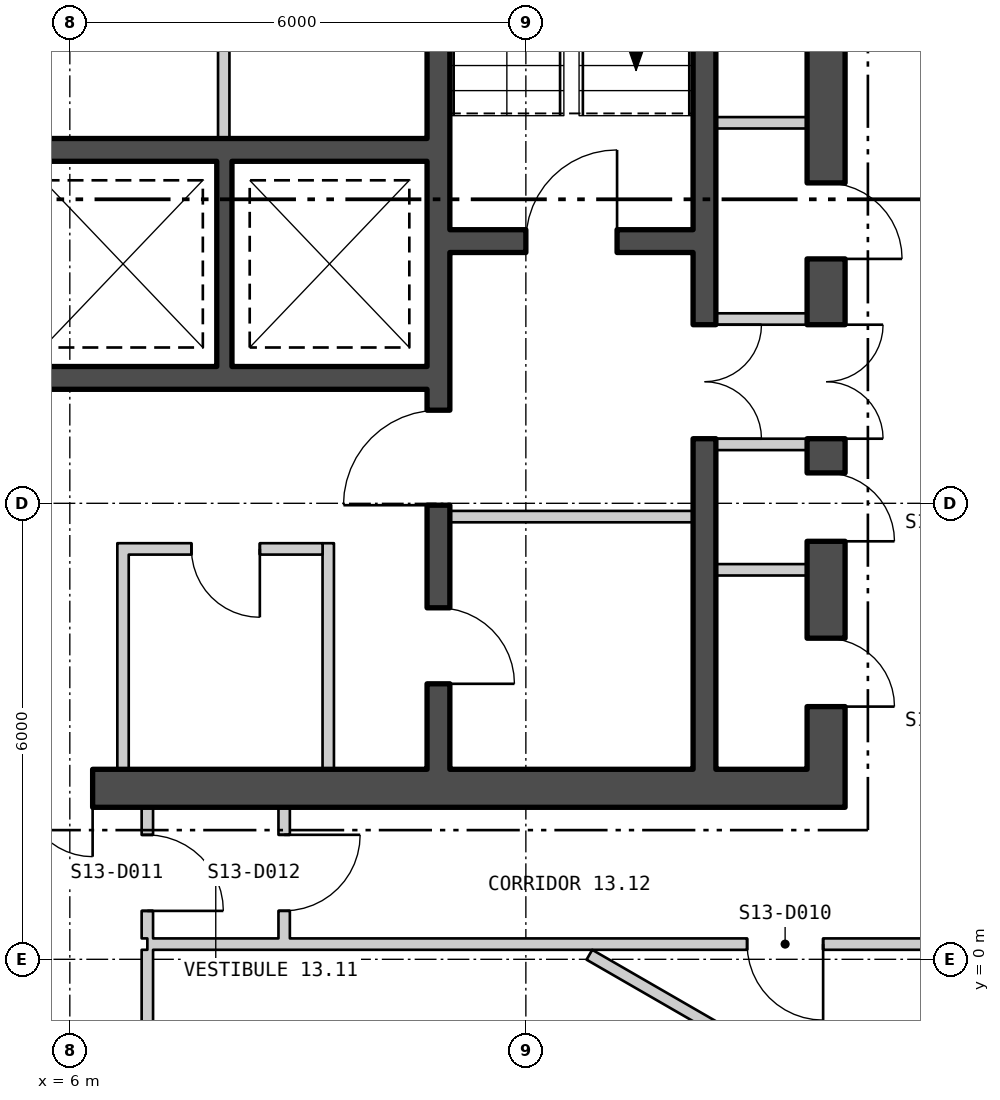
"""IFC4 building model, lengths in metres.
Left out: names, types, materials, properties, quantities, classifications, styles, units other than length and angle.
Written with IfcOpenShell. Run it as: python <this file> out.ifc"""

import sys

from ifc_helpers import new_model, si_unit, direction, frame, frame_2d, origin, place, context, subcontext, project, spatial, polyline, rectangle, outline, extrude, element, fill, save


model = new_model("IFC4")
c1 = context("Model", 3, precision=1e-05, world=origin(), true_north=direction((0.0, 1.0)))
c2 = subcontext(c1, "Body", "Model", "MODEL_VIEW")
j1 = project(units=[si_unit("LENGTHUNIT", "METRE"), si_unit("PLANEANGLEUNIT", "RADIAN")], contexts=[c1])
p1 = place(None, origin())
s1 = spatial("IfcSite", under=j1, at=p1, CompositionType="ELEMENT")
p2 = place(p1, origin())
s2 = spatial("IfcBuilding", under=s1, at=p2, CompositionType="ELEMENT")
p3 = place(p2, frame((0.0, 0.0, 174.9)))
s3 = spatial("IfcBuildingStorey", under=s2, at=p3, CompositionType="ELEMENT", Elevation=174.9)
p4 = place(p3, frame((3.9, -26.401, -0.18), z_axis=(0.0, 0.0, 1.0), x_axis=(0.500000335318, 0.866025210188, 0.0)))
e1 = element("IfcWall", 1, at=p4, inside=s3, PredefinedType="SOLIDWALL", context=c2, shape_type="SweptSolid", body=[
    extrude(outline(polyline([(-0.13, -0.225), (45.88, -0.225), (45.62, 0.225), (0.13, 0.225), (-0.13, -0.225)])), origin(), (0.0, 0.0, 1.0), 3.68),
])
p5 = place(p4, frame((1.425, 0.0, 1.08)))
e2 = element("IfcOpeningElement", 2, at=p5, cuts=e1, PredefinedType="OPENING", context=c2, shape_type="SweptSolid", body=[
    extrude(rectangle(XDim=2.4, YDim=2.0, at=frame_2d((1.2, 1.0))), frame((0.0, 0.235, 0.0), z_axis=(0.0, -1.0, 0.0), x_axis=(1.0, 0.0, 0.0)), (0.0, 0.0, 1.0), 0.47),
])
p6 = place(p4, frame((5.895, 0.0, 1.08)))
e3 = element("IfcOpeningElement", 3, at=p6, cuts=e1, PredefinedType="OPENING", context=c2, shape_type="SweptSolid", body=[
    extrude(rectangle(XDim=2.4, YDim=2.0, at=frame_2d((1.2, 1.0))), frame((0.0, 0.235, 0.0), z_axis=(0.0, -1.0, 0.0), x_axis=(1.0, 0.0, 0.0)), (0.0, 0.0, 1.0), 0.47),
])
p7 = place(p4, frame((10.403, 0.0, 1.08)))
e4 = element("IfcOpeningElement", 4, at=p7, cuts=e1, PredefinedType="OPENING", context=c2, shape_type="SweptSolid", body=[
    extrude(rectangle(XDim=2.4, YDim=2.0, at=frame_2d((1.2, 1.0))), frame((0.0, 0.235, 0.0), z_axis=(0.0, -1.0, 0.0), x_axis=(1.0, 0.0, 0.0)), (0.0, 0.0, 1.0), 0.47),
])
p8 = place(p4, frame((14.912, 0.0, 1.08)))
e5 = element("IfcOpeningElement", 5, at=p8, cuts=e1, PredefinedType="OPENING", context=c2, shape_type="SweptSolid", body=[
    extrude(rectangle(XDim=2.4, YDim=2.0, at=frame_2d((1.2, 1.0))), frame((0.0, 0.235, 0.0), z_axis=(0.0, -1.0, 0.0), x_axis=(1.0, 0.0, 0.0)), (0.0, 0.0, 1.0), 0.47),
])
p9 = place(p4, frame((19.421, 0.0, 1.08)))
e6 = element("IfcOpeningElement", 6, at=p9, cuts=e1, PredefinedType="OPENING", context=c2, shape_type="SweptSolid", body=[
    extrude(rectangle(XDim=2.4, YDim=2.0, at=frame_2d((1.2, 1.0))), frame((0.0, 0.235, 0.0), z_axis=(0.0, -1.0, 0.0), x_axis=(1.0, 0.0, 0.0)), (0.0, 0.0, 1.0), 0.47),
])
p10 = place(p4, frame((23.929, 0.0, 1.08)))
e7 = element("IfcOpeningElement", 7, at=p10, cuts=e1, PredefinedType="OPENING", context=c2, shape_type="SweptSolid", body=[
    extrude(rectangle(XDim=2.4, YDim=2.0, at=frame_2d((1.2, 1.0))), frame((0.0, 0.235, 0.0), z_axis=(0.0, -1.0, 0.0), x_axis=(1.0, 0.0, 0.0)), (0.0, 0.0, 1.0), 0.47),
])
p11 = place(p4, frame((37.455, 0.0, 1.08)))
e8 = element("IfcOpeningElement", 8, at=p11, cuts=e1, PredefinedType="OPENING", context=c2, shape_type="SweptSolid", body=[
    extrude(rectangle(XDim=2.4, YDim=2.0, at=frame_2d((1.2, 1.0))), frame((0.0, 0.235, 0.0), z_axis=(0.0, -1.0, 0.0), x_axis=(1.0, 0.0, 0.0)), (0.0, 0.0, 1.0), 0.47),
])
p12 = place(p4, frame((41.925, 0.0, 1.08)))
e9 = element("IfcOpeningElement", 9, at=p12, cuts=e1, PredefinedType="OPENING", context=c2, shape_type="SweptSolid", body=[
    extrude(rectangle(XDim=2.4, YDim=2.0, at=frame_2d((1.2, 1.0))), frame((0.0, 0.235, 0.0), z_axis=(0.0, -1.0, 0.0), x_axis=(1.0, 0.0, 0.0)), (0.0, 0.0, 1.0), 0.47),
])
p13 = place(p3, frame((-16.2, 2.25, 0.0), z_axis=(0.0, 0.0, 1.0), x_axis=(1.0, 0.0, 0.0)))
e10 = element("IfcWall", 10, at=p13, inside=s3, PredefinedType="SHEAR", context=c2, shape_type="SweptSolid", body=[
    extrude(rectangle(XDim=32.4, YDim=0.5, at=frame_2d((16.2, 0.0))), origin(), (0.0, 0.0, 1.0), 3.7),
])
p14 = place(p13, frame((10.7, 0.0, 0.0)))
e11 = element("IfcOpeningElement", 11, at=p14, cuts=e10, PredefinedType="OPENING", context=c2, shape_type="SweptSolid", body=[
    extrude(rectangle(XDim=1.8, YDim=2.4, at=frame_2d((0.9, 1.2))), frame((0.0, 0.26, 0.0), z_axis=(0.0, -1.0, 0.0), x_axis=(1.0, 0.0, 0.0)), (0.0, 0.0, 1.0), 0.52),
])
p15 = place(p13, frame((20.7, 0.0, 0.0)))
e12 = element("IfcOpeningElement", 12, at=p15, cuts=e10, PredefinedType="OPENING", context=c2, shape_type="SweptSolid", body=[
    extrude(rectangle(XDim=1.8, YDim=2.4, at=frame_2d((0.9, 1.2))), frame((0.0, 0.26, 0.0), z_axis=(0.0, -1.0, 0.0), x_axis=(1.0, 0.0, 0.0)), (0.0, 0.0, 1.0), 0.52),
])
p16 = place(p3, frame((15.95, 2.5, 0.0), z_axis=(0.0, 0.0, 1.0), x_axis=(0.0, 1.0, 0.0)))
e13 = element("IfcWall", 13, at=p16, inside=s3, PredefinedType="SHEAR", context=c2, shape_type="SweptSolid", body=[
    extrude(rectangle(XDim=15.0, YDim=0.5, at=frame_2d((7.5, 0.0))), origin(), (0.0, 0.0, 1.0), 3.7),
])
p17 = place(p16, frame((4.35, 0.0, 0.0)))
e14 = element("IfcOpeningElement", 14, at=p17, cuts=e13, PredefinedType="OPENING", context=c2, shape_type="SweptSolid", body=[
    extrude(rectangle(XDim=1.5, YDim=2.1, at=frame_2d((0.75, 1.05))), frame((0.0, 0.26, 0.0), z_axis=(0.0, -1.0, 0.0), x_axis=(1.0, 0.0, 0.0)), (0.0, 0.0, 1.0), 0.52),
])
p18 = place(p16, frame((0.825, 0.0, 0.0)))
e15 = element("IfcOpeningElement", 15, at=p18, cuts=e13, PredefinedType="OPENING", context=c2, shape_type="SweptSolid", body=[
    extrude(rectangle(XDim=0.9, YDim=2.1, at=frame_2d((0.45, 1.05))), frame((0.0, 0.26, 0.0), z_axis=(0.0, -1.0, 0.0), x_axis=(1.0, 0.0, 0.0)), (0.0, 0.0, 1.0), 0.52),
])
p19 = place(p16, frame((3.0, 0.0, 0.0)))
e16 = element("IfcOpeningElement", 16, at=p19, cuts=e13, PredefinedType="OPENING", context=c2, shape_type="SweptSolid", body=[
    extrude(rectangle(XDim=0.9, YDim=2.1, at=frame_2d((0.45, 1.05))), frame((0.0, 0.26, 0.0), z_axis=(0.0, -1.0, 0.0), x_axis=(1.0, 0.0, 0.0)), (0.0, 0.0, 1.0), 0.52),
])
p20 = place(p16, frame((6.716, 0.0, 0.0)))
e17 = element("IfcOpeningElement", 17, at=p20, cuts=e13, PredefinedType="OPENING", context=c2, shape_type="SweptSolid", body=[
    extrude(rectangle(XDim=1.0, YDim=2.1, at=frame_2d((0.5, 1.05))), frame((0.0, 0.26, 0.0), z_axis=(0.0, -1.0, 0.0), x_axis=(1.0, 0.0, 0.0)), (0.0, 0.0, 1.0), 0.52),
])
p21 = place(p16, frame((11.341, 0.0, 0.0)))
e18 = element("IfcOpeningElement", 18, at=p21, cuts=e13, PredefinedType="OPENING", context=c2, shape_type="SweptSolid", body=[
    extrude(rectangle(XDim=0.9, YDim=2.1, at=frame_2d((0.45, 1.05))), frame((0.0, 0.26, 0.0), z_axis=(0.0, -1.0, 0.0), x_axis=(1.0, 0.0, 0.0)), (0.0, 0.0, 1.0), 0.52),
])
p22 = place(p3, frame((10.85, 2.5, 0.0), z_axis=(0.0, 0.0, 1.0), x_axis=(0.0, 1.0, 0.0)))
e19 = element("IfcWall", 19, at=p22, inside=s3, PredefinedType="SHEAR", context=c2, shape_type="SweptSolid", body=[
    extrude(rectangle(XDim=15.0, YDim=0.3, at=frame_2d((7.5, 0.0))), origin(), (0.0, 0.0, 1.0), 3.7),
])
p23 = place(p22, frame((3.475, 0.0, 0.0)))
e20 = element("IfcOpeningElement", 20, at=p23, cuts=e19, PredefinedType="OPENING", context=c2, shape_type="SweptSolid", body=[
    extrude(rectangle(XDim=1.25, YDim=2.1, at=frame_2d((0.625, 1.05))), frame((0.0, 0.16, 0.0), z_axis=(0.0, -1.0, 0.0), x_axis=(1.0, 0.0, 0.0)), (0.0, 0.0, 1.0), 0.32),
])
p24 = place(p22, frame((1.125, 0.0, 0.0)))
e21 = element("IfcOpeningElement", 21, at=p24, cuts=e19, PredefinedType="OPENING", context=c2, shape_type="SweptSolid", body=[
    extrude(rectangle(XDim=1.0, YDim=2.1, at=frame_2d((0.5, 1.05))), frame((0.0, 0.16, 0.0), z_axis=(0.0, -1.0, 0.0), x_axis=(1.0, 0.0, 0.0)), (0.0, 0.0, 1.0), 0.32),
])
p25 = place(p3, frame((14.35, 2.5, 0.0), z_axis=(0.0, 0.0, 1.0), x_axis=(0.0, 1.0, 0.0)))
e22 = element("IfcWall", 22, at=p25, inside=s3, PredefinedType="SHEAR", context=c2, shape_type="SweptSolid", body=[
    extrude(rectangle(XDim=15.0, YDim=0.3, at=frame_2d((7.5, 0.0))), origin(), (0.0, 0.0, 1.0), 3.7),
])
p26 = place(p25, frame((4.35, 0.0, 0.0)))
e23 = element("IfcOpeningElement", 23, at=p26, cuts=e22, PredefinedType="OPENING", context=c2, shape_type="SweptSolid", body=[
    extrude(rectangle(XDim=1.5, YDim=2.1, at=frame_2d((0.75, 1.05))), frame((0.0, 0.16, 0.0), z_axis=(0.0, -1.0, 0.0), x_axis=(1.0, 0.0, 0.0)), (0.0, 0.0, 1.0), 0.32),
])
p27 = place(p3, frame((11.0, 9.45, 0.0), z_axis=(0.0, 0.0, 1.0), x_axis=(1.0, 0.0, 0.0)))
e24 = element("IfcWall", 24, at=p27, inside=s3, PredefinedType="SHEAR", context=c2, shape_type="SweptSolid", body=[
    extrude(rectangle(XDim=3.2, YDim=0.3, at=frame_2d((1.6, 0.0))), origin(), (0.0, 0.0, 1.0), 3.7),
])
p28 = place(p27, frame((1.0, 0.0, 0.0)))
e25 = element("IfcOpeningElement", 25, at=p28, cuts=e24, PredefinedType="OPENING", context=c2, shape_type="SweptSolid", body=[
    extrude(rectangle(XDim=1.2, YDim=2.1, at=frame_2d((0.6, 1.05))), frame((0.0, 0.16, 0.0), z_axis=(0.0, -1.0, 0.0), x_axis=(1.0, 0.0, 0.0)), (0.0, 0.0, 1.0), 0.32),
])
p29 = place(p3, frame((2.6, 10.65, 0.0), z_axis=(0.0, 0.0, 1.0), x_axis=(1.0, 0.0, 0.0)))
e26 = element("IfcWall", 26, at=p29, inside=s3, PredefinedType="SHEAR", context=c2, shape_type="SweptSolid", body=[
    extrude(rectangle(XDim=8.1, YDim=0.3, at=frame_2d((4.05, 0.0))), origin(), (0.0, 0.0, 1.0), 3.7),
])
p30 = place(p29, frame((0.933, 0.0, 0.0)))
e27 = element("IfcOpeningElement", 27, at=p30, cuts=e26, PredefinedType="OPENING", context=c2, shape_type="SweptSolid", body=[
    extrude(rectangle(XDim=1.0, YDim=2.1, at=frame_2d((0.5, 1.05))), frame((0.0, 0.16, 0.0), z_axis=(0.0, -1.0, 0.0), x_axis=(1.0, 0.0, 0.0)), (0.0, 0.0, 1.0), 0.32),
])
p31 = place(p3, frame((2.6, 7.65, 0.0), z_axis=(0.0, 0.0, 1.0), x_axis=(1.0, 0.0, 0.0)))
e28 = element("IfcWall", 28, at=p31, inside=s3, PredefinedType="SHEAR", context=c2, shape_type="SweptSolid", body=[
    extrude(rectangle(XDim=8.1, YDim=0.3, at=frame_2d((4.05, 0.0))), origin(), (0.0, 0.0, 1.0), 3.7),
])
p32 = place(p3, frame((8.033, 7.8, 0.0), z_axis=(0.0, 0.0, 1.0), x_axis=(0.0, 1.0, 0.0)))
e29 = element("IfcWall", 29, at=p32, inside=s3, PredefinedType="SHEAR", context=c2, shape_type="SweptSolid", body=[
    extrude(rectangle(XDim=2.7, YDim=0.2, at=frame_2d((1.35, 0.0))), origin(), (0.0, 0.0, 1.0), 3.7),
])
p33 = place(p3, frame((8.025, 10.8, 0.0), z_axis=(0.0, 0.0, 1.0), x_axis=(0.0, 1.0, 0.0)))
e30 = element("IfcWall", 30, at=p33, inside=s3, PredefinedType="PARTITIONING", context=c2, shape_type="SweptSolid", body=[
    extrude(rectangle(XDim=3.6, YDim=0.15, at=frame_2d((1.8, 0.0))), origin(), (0.0, 0.0, 1.0), 3.7),
])
p34 = place(p33, frame((1.175, 0.0, 0.0)))
e31 = element("IfcOpeningElement", 31, at=p34, cuts=e30, PredefinedType="OPENING", context=c2, shape_type="SweptSolid", body=[
    extrude(rectangle(XDim=1.25, YDim=2.1, at=frame_2d((0.625, 1.05))), frame((0.0, 0.085, 0.0), z_axis=(0.0, -1.0, 0.0), x_axis=(1.0, 0.0, 0.0)), (0.0, 0.0, 1.0), 0.17),
])
p35 = place(p3, frame((11.0, 5.825, 0.0), z_axis=(0.0, 0.0, 1.0), x_axis=(1.0, 0.0, 0.0)))
e32 = element("IfcWall", 32, at=p35, inside=s3, PredefinedType="PARTITIONING", context=c2, shape_type="SweptSolid", body=[
    extrude(rectangle(XDim=3.2, YDim=0.15, at=frame_2d((1.6, 0.0))), origin(), (0.0, 0.0, 1.0), 3.7),
])
for number, where, z_axis, x_axis in (
    (33, (14.5, 6.775, 0.0), (0.0, 0.0, 1.0), (1.0, 0.0, 0.0)),
    (34, (14.5, 8.425, 0.0), (0.0, 0.0, 1.0), (1.0, 0.0, 0.0)),
    (35, (14.5, 5.125, 0.0), (0.0, 0.0, 1.0), (1.0, 0.0, 0.0)),
    (36, (14.5, 11.007, 0.0), (0.0, 0.0, 1.0), (1.0, 0.0, 0.0)),
):
    element("IfcWall", number, at=place(p3, frame(where, z_axis=z_axis, x_axis=x_axis)), inside=s3, PredefinedType="PARTITIONING", context=c2, shape_type="SweptSolid", body=[
        extrude(rectangle(XDim=1.2, YDim=0.15, at=frame_2d((0.6, 0.0))), origin(), (0.0, 0.0, 1.0), 3.7),
    ])
for number, where, z_axis, x_axis in (
    (37, (6.7, 2.5, 0.0), (0.0, 0.0, 1.0), (0.0, 1.0, 0.0)),
    (38, (9.4, 2.5, 0.0), (0.0, 0.0, 1.0), (0.0, 1.0, 0.0)),
):
    element("IfcWall", number, at=place(p3, frame(where, z_axis=z_axis, x_axis=x_axis)), inside=s3, PredefinedType="PARTITIONING", context=c2, shape_type="SweptSolid", body=[
        extrude(rectangle(XDim=2.975, YDim=0.15, at=frame_2d((1.488, 0.0))), origin(), (0.0, 0.0, 1.0), 3.7),
    ])
p36 = place(p3, frame((6.775, 5.4, 0.0), z_axis=(0.0, 0.0, 1.0), x_axis=(1.0, 0.0, 0.0)))
e39 = element("IfcWall", 39, at=p36, inside=s3, PredefinedType="PARTITIONING", context=c2, shape_type="SweptSolid", body=[
    extrude(rectangle(XDim=2.55, YDim=0.15, at=frame_2d((1.275, 0.0))), origin(), (0.0, 0.0, 1.0), 3.7),
])
p37 = place(p36, frame((0.825, 0.0, 0.0)))
e40 = element("IfcOpeningElement", 40, at=p37, cuts=e39, PredefinedType="OPENING", context=c2, shape_type="SweptSolid", body=[
    extrude(rectangle(XDim=0.9, YDim=2.1, at=frame_2d((0.45, 1.05))), frame((0.0, 0.085, 0.0), z_axis=(0.0, -1.0, 0.0), x_axis=(1.0, 0.0, 0.0)), (0.0, 0.0, 1.0), 0.17),
])
p38 = place(p3, frame((7.02, -1.125, 0.0), z_axis=(0.0, 0.0, 1.0), x_axis=(0.0, 1.0, 0.0)))
e41 = element("IfcWall", 41, at=p38, inside=s3, PredefinedType="PARTITIONING", context=c2, shape_type="SweptSolid", body=[
    extrude(rectangle(XDim=1.25, YDim=0.15, at=frame_2d((0.625, 0.0))), origin(), (0.0, 0.0, 1.0), 3.7),
])
p39 = place(p3, frame((7.02, 0.2, 0.0), z_axis=(0.0, 0.0, 1.0), x_axis=(1.0, 0.0, 0.0)))
e42 = element("IfcWall", 42, at=p39, inside=s3, PredefinedType="PARTITIONING", context=c2, shape_type="SweptSolid", body=[
    extrude(rectangle(XDim=10.905, YDim=0.15, at=frame_2d((5.452, 0.0))), origin(), (0.0, 0.0, 1.0), 3.7),
])
p40 = place(p39, frame((7.891, 0.0, 0.0)))
e43 = element("IfcOpeningElement", 43, at=p40, cuts=e42, PredefinedType="OPENING", context=c2, shape_type="SweptSolid", body=[
    extrude(rectangle(XDim=1.0, YDim=2.1, at=frame_2d((0.5, 1.05))), frame((0.0, 0.085, 0.0), z_axis=(0.0, -1.0, 0.0), x_axis=(1.0, 0.0, 0.0)), (0.0, 0.0, 1.0), 0.17),
])
p41 = place(p3, frame((7.02, 0.275, 0.0), z_axis=(0.0, 0.0, 1.0), x_axis=(0.0, 1.0, 0.0)))
e44 = element("IfcWall", 44, at=p41, inside=s3, PredefinedType="PARTITIONING", context=c2, shape_type="SweptSolid", body=[
    extrude(rectangle(XDim=1.725, YDim=0.15, at=frame_2d((0.863, 0.0))), origin(), (0.0, 0.0, 1.0), 3.7),
])
p42 = place(p41, frame((0.362, 0.0, 0.0)))
e45 = element("IfcOpeningElement", 45, at=p42, cuts=e44, PredefinedType="OPENING", context=c2, shape_type="SweptSolid", body=[
    extrude(rectangle(XDim=1.0, YDim=2.1, at=frame_2d((0.5, 1.05))), frame((0.0, 0.085, 0.0), z_axis=(0.0, -1.0, 0.0), x_axis=(1.0, 0.0, 0.0)), (0.0, 0.0, 1.0), 0.17),
])
p43 = place(p3, frame((8.82, 0.275, 0.0), z_axis=(0.0, 0.0, 1.0), x_axis=(0.0, 1.0, 0.0)))
e46 = element("IfcWall", 46, at=p43, inside=s3, PredefinedType="PARTITIONING", context=c2, shape_type="SweptSolid", body=[
    extrude(rectangle(XDim=1.725, YDim=0.15, at=frame_2d((0.863, 0.0))), origin(), (0.0, 0.0, 1.0), 3.7),
])
p44 = place(p43, frame((0.363, 0.0, 0.0)))
e47 = element("IfcOpeningElement", 47, at=p44, cuts=e46, PredefinedType="OPENING", context=c2, shape_type="SweptSolid", body=[
    extrude(rectangle(XDim=1.0, YDim=2.1, at=frame_2d((0.5, 1.05))), frame((0.0, 0.085, 0.0), z_axis=(0.0, -1.0, 0.0), x_axis=(1.0, 0.0, 0.0)), (0.0, 0.0, 1.0), 0.17),
])
p45 = place(p3, frame((12.836, 0.06, 0.0), z_axis=(0.0, 0.0, 1.0), x_axis=(0.866088799389, -0.499890179513, 0.0)))
e48 = element("IfcWall", 48, at=p45, inside=s3, PredefinedType="PARTITIONING", context=c2, shape_type="SweptSolid", body=[
    extrude(rectangle(XDim=4.817, YDim=0.15, at=frame_2d((2.409, 0.0))), origin(), (0.0, 0.0, 1.0), 3.7),
])
p46 = place(p28, origin())
e49 = element("IfcDoor", 49, at=p46, inside=s3, OperationType="SINGLE_SWING_LEFT", PredefinedType="DOOR", context=c2, shape_type="SweptSolid", body=[
    extrude(rectangle(XDim=1.2, YDim=2.1, at=frame_2d((0.6, 1.05))), frame((0.0, 0.025, 0.0), z_axis=(0.0, -1.0, 0.0), x_axis=(1.0, 0.0, 0.0)), (0.0, 0.0, 1.0), 0.05),
])
fill(e25, e49)
p47 = place(p23, origin())
e50 = element("IfcDoor", 50, at=p47, inside=s3, OperationType="SINGLE_SWING_RIGHT", PredefinedType="DOOR", context=c2, shape_type="SweptSolid", body=[
    extrude(rectangle(XDim=1.25, YDim=2.1, at=frame_2d((0.625, 1.05))), frame((0.0, 0.025, 0.0), z_axis=(0.0, -1.0, 0.0), x_axis=(1.0, 0.0, 0.0)), (0.0, 0.0, 1.0), 0.05),
])
fill(e20, e50)
p48 = place(p24, origin())
e51 = element("IfcDoor", 51, at=p48, inside=s3, OperationType="SINGLE_SWING_LEFT", PredefinedType="DOOR", context=c2, shape_type="SweptSolid", body=[
    extrude(rectangle(XDim=1.0, YDim=2.1, at=frame_2d((0.5, 1.05))), frame((0.0, 0.025, 0.0), z_axis=(0.0, -1.0, 0.0), x_axis=(1.0, 0.0, 0.0)), (0.0, 0.0, 1.0), 0.05),
])
fill(e21, e51)
p49 = place(p26, origin())
e52 = element("IfcDoor", 52, at=p49, inside=s3, OperationType="DOUBLE_DOOR_SINGLE_SWING", PredefinedType="DOOR", context=c2, shape_type="SweptSolid", body=[
    extrude(rectangle(XDim=1.5, YDim=2.1, at=frame_2d((0.75, 1.05))), frame((0.0, 0.025, 0.0), z_axis=(0.0, -1.0, 0.0), x_axis=(1.0, 0.0, 0.0)), (0.0, 0.0, 1.0), 0.05),
])
fill(e23, e52)
p50 = place(p17, origin())
e53 = element("IfcDoor", 53, at=p50, inside=s3, OperationType="DOUBLE_DOOR_SINGLE_SWING", PredefinedType="DOOR", context=c2, shape_type="SweptSolid", body=[
    extrude(rectangle(XDim=1.5, YDim=2.1, at=frame_2d((0.75, 1.05))), frame((0.0, 0.025, 0.0), z_axis=(0.0, -1.0, 0.0), x_axis=(1.0, 0.0, 0.0)), (0.0, 0.0, 1.0), 0.05),
])
fill(e14, e53)
p51 = place(p18, origin())
e54 = element("IfcDoor", 54, at=p51, inside=s3, OperationType="SINGLE_SWING_LEFT", PredefinedType="DOOR", context=c2, shape_type="SweptSolid", body=[
    extrude(rectangle(XDim=0.9, YDim=2.1, at=frame_2d((0.45, 1.05))), frame((0.0, 0.025, 0.0), z_axis=(0.0, -1.0, 0.0), x_axis=(1.0, 0.0, 0.0)), (0.0, 0.0, 1.0), 0.05),
])
fill(e15, e54)
p52 = place(p19, origin())
e55 = element("IfcDoor", 55, at=p52, inside=s3, OperationType="SINGLE_SWING_LEFT", PredefinedType="DOOR", context=c2, shape_type="SweptSolid", body=[
    extrude(rectangle(XDim=0.9, YDim=2.1, at=frame_2d((0.45, 1.05))), frame((0.0, 0.025, 0.0), z_axis=(0.0, -1.0, 0.0), x_axis=(1.0, 0.0, 0.0)), (0.0, 0.0, 1.0), 0.05),
])
fill(e16, e55)
p53 = place(p20, origin())
e56 = element("IfcDoor", 56, at=p53, inside=s3, OperationType="SINGLE_SWING_LEFT", PredefinedType="DOOR", context=c2, shape_type="SweptSolid", body=[
    extrude(rectangle(XDim=1.0, YDim=2.1, at=frame_2d((0.5, 1.05))), frame((0.0, 0.025, 0.0), z_axis=(0.0, -1.0, 0.0), x_axis=(1.0, 0.0, 0.0)), (0.0, 0.0, 1.0), 0.05),
])
fill(e17, e56)
p54 = place(p37, origin())
e57 = element("IfcDoor", 57, at=p54, inside=s3, OperationType="SINGLE_SWING_RIGHT", PredefinedType="DOOR", context=c2, shape_type="SweptSolid", body=[
    extrude(rectangle(XDim=0.9, YDim=2.1, at=frame_2d((0.45, 1.05))), frame((0.0, 0.025, 0.0), z_axis=(0.0, -1.0, 0.0), x_axis=(1.0, 0.0, 0.0)), (0.0, 0.0, 1.0), 0.05),
])
fill(e40, e57)
p55 = place(p15, origin())
e58 = element("IfcDoor", 58, at=p55, inside=s3, OperationType="DOUBLE_DOOR_SINGLE_SWING", PredefinedType="DOOR", context=c2, shape_type="SweptSolid", body=[
    extrude(rectangle(XDim=1.8, YDim=2.4, at=frame_2d((0.9, 1.2))), frame((0.0, 0.025, 0.0), z_axis=(0.0, -1.0, 0.0), x_axis=(1.0, 0.0, 0.0)), (0.0, 0.0, 1.0), 0.05),
])
fill(e12, e58)
p56 = place(p40, origin())
e59 = element("IfcDoor", 59, at=p56, inside=s3, OperationType="SINGLE_SWING_RIGHT", PredefinedType="DOOR", context=c2, shape_type="SweptSolid", body=[
    extrude(rectangle(XDim=1.0, YDim=2.1, at=frame_2d((0.5, 1.05))), frame((0.0, 0.025, 0.0), z_axis=(0.0, -1.0, 0.0), x_axis=(1.0, 0.0, 0.0)), (0.0, 0.0, 1.0), 0.05),
])
fill(e43, e59)
p57 = place(p42, origin())
e60 = element("IfcDoor", 60, at=p57, inside=s3, OperationType="SINGLE_SWING_LEFT", PredefinedType="DOOR", context=c2, shape_type="SweptSolid", body=[
    extrude(rectangle(XDim=1.0, YDim=2.1, at=frame_2d((0.5, 1.05))), frame((0.0, 0.025, 0.0), z_axis=(0.0, -1.0, 0.0), x_axis=(1.0, 0.0, 0.0)), (0.0, 0.0, 1.0), 0.05),
])
fill(e45, e60)
p58 = place(p44, origin())
e61 = element("IfcDoor", 61, at=p58, inside=s3, OperationType="SINGLE_SWING_RIGHT", PredefinedType="DOOR", context=c2, shape_type="SweptSolid", body=[
    extrude(rectangle(XDim=1.0, YDim=2.1, at=frame_2d((0.5, 1.05))), frame((0.0, 0.025, 0.0), z_axis=(0.0, -1.0, 0.0), x_axis=(1.0, 0.0, 0.0)), (0.0, 0.0, 1.0), 0.05),
])
fill(e47, e61)
save(model, sys.argv[1])
